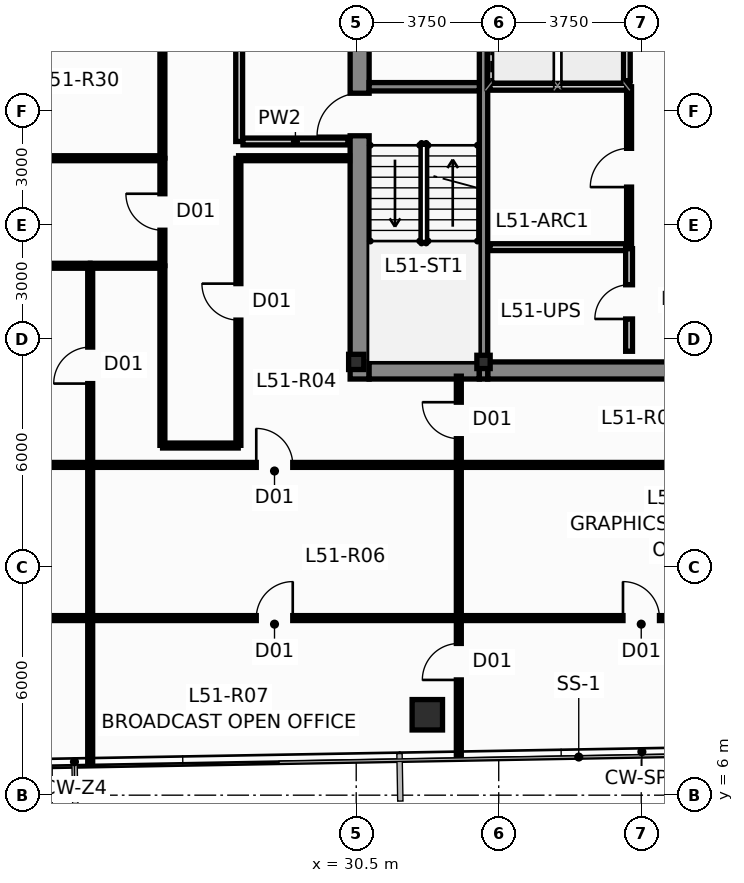
"""IFC4 building model, lengths in metres.
Left out: names, types, materials, properties, quantities, classifications, styles, units other than length and angle.
Written with IfcOpenShell. Run it as: python <this file> out.ifc"""

import sys

from ifc_helpers import new_model, si_unit, direction, frame, frame_2d, origin, origin_2d, place, context, subcontext, project, spatial, rectangle, hollow_rectangle, i_section, extrude, source, transform, mapped, element, fill, save


model = new_model("IFC4")
c1 = context("Model", 3, precision=1e-05, world=origin(), true_north=direction((0.0, 1.0)))
c2 = subcontext(c1, "Body", "Model", "MODEL_VIEW")
j1 = project(units=[si_unit("LENGTHUNIT", "METRE"), si_unit("PLANEANGLEUNIT", "RADIAN")], contexts=[c1])
p1 = place(None, origin())
s1 = spatial("IfcSite", under=j1, at=p1, CompositionType="ELEMENT")
p2 = place(p1, origin())
s2 = spatial("IfcBuilding", under=s1, at=p2, CompositionType="ELEMENT")
p3 = place(p2, frame((0.0, 0.0, 195.0)))
s3 = spatial("IfcBuildingStorey", under=s2, at=p3, CompositionType="ELEMENT", Elevation=195.0)
m1 = source(origin(), c2, "Body", "SweptSolid", [
    extrude(i_section(OverallWidth=0.4, OverallDepth=0.4, WebThickness=0.02, FlangeThickness=0.032, at=origin_2d()), origin(), (0.0, 0.0, 1.0), 3.65),
])
p4 = place(p3, frame((30.5, 17.4, 0.0), z_axis=(0.0, 0.0, 1.0), x_axis=(1.0, 0.0, 0.0)))
e1 = element("IfcColumn", 1, at=p4, inside=s3, PredefinedType="COLUMN", context=c2, shape_type="MappedRepresentation", body=[
    mapped(m1, transform((0.0, 0.0, 0.0), scale=1.0)),
])
m2 = source(origin(), c2, "Body", "SweptSolid", [
    extrude(hollow_rectangle(XDim=0.35, YDim=0.35, WallThickness=0.016, at=origin_2d()), origin(), (0.0, 0.0, 1.0), 3.65),
])
p5 = place(p3, frame((33.85, 17.4, 0.0), z_axis=(0.0, 0.0, 1.0), x_axis=(1.0, 0.0, 0.0)))
e2 = element("IfcColumn", 2, at=p5, inside=s3, PredefinedType="COLUMN", context=c2, shape_type="MappedRepresentation", body=[
    mapped(m2, transform((0.0, 0.0, 0.0), scale=1.0)),
])
p6 = place(p3, frame((30.59, 16.95, 0.0), z_axis=(0.0, 0.0, 1.0), x_axis=(0.0, 1.0, 0.0)))
e3 = element("IfcWall", 3, at=p6, inside=s3, PredefinedType="SHEAR", context=c2, shape_type="SweptSolid", body=[
    extrude(rectangle(XDim=13.275, YDim=0.5, at=frame_2d((6.638, 0.0))), origin(), (0.0, 0.0, 1.0), 3.65),
])
p7 = place(p6, frame((6.4, 0.0, 0.0)))
e4 = element("IfcOpeningElement", 4, at=p7, cuts=e3, PredefinedType="OPENING", context=c2, shape_type="SweptSolid", body=[
    extrude(rectangle(XDim=1.12, YDim=2.15, at=frame_2d((0.56, 1.075))), frame((0.0, 0.262, 0.0), z_axis=(0.0, -1.0, 0.0), x_axis=(1.0, 0.0, 0.0)), (0.0, 0.0, 1.0), 0.524),
])
p8 = place(p6, frame((10.85, 0.0, 0.0)))
e5 = element("IfcOpeningElement", 5, at=p8, cuts=e3, PredefinedType="OPENING", context=c2, shape_type="SweptSolid", body=[
    extrude(rectangle(XDim=1.2, YDim=2.2, at=frame_2d((0.6, 1.1))), frame((0.0, 0.262, 0.0), z_axis=(0.0, -1.0, 0.0), x_axis=(1.0, 0.0, 0.0)), (0.0, 0.0, 1.0), 0.524),
])
p9 = place(p3, frame((30.84, 17.175, 0.0), z_axis=(0.0, 0.0, 1.0), x_axis=(1.0, 0.0, 0.0)))
e6 = element("IfcWall", 6, at=p9, inside=s3, PredefinedType="SHEAR", context=c2, shape_type="SweptSolid", body=[
    extrude(rectangle(XDim=2.9, YDim=0.45, at=frame_2d((1.45, 0.0))), origin(), (0.0, 0.0, 1.0), 3.65),
])
p10 = place(p3, frame((33.96, 17.175, 0.0), z_axis=(0.0, 0.0, 1.0), x_axis=(1.0, 0.0, 0.0)))
e7 = element("IfcWall", 7, at=p10, inside=s3, PredefinedType="SHEAR", context=c2, shape_type="SweptSolid", body=[
    extrude(rectangle(XDim=8.08, YDim=0.45, at=frame_2d((4.04, 0.0))), origin(), (0.0, 0.0, 1.0), 3.65),
])
p11 = place(p3, frame((33.85, 16.95, 0.0), z_axis=(0.0, 0.0, 1.0), x_axis=(0.0, 1.0, 0.0)))
e8 = element("IfcWall", 8, at=p11, inside=s3, PredefinedType="SHEAR", context=c2, shape_type="SweptSolid", body=[
    extrude(rectangle(XDim=13.275, YDim=0.22, at=frame_2d((6.638, 0.0))), origin(), (0.0, 0.0, 1.0), 3.65),
])
p12 = place(p3, frame((30.84, 24.64, 0.0), z_axis=(0.0, 0.0, 1.0), x_axis=(1.0, 0.0, 0.0)))
e9 = element("IfcWall", 9, at=p12, inside=s3, PredefinedType="SHEAR", context=c2, shape_type="SweptSolid", body=[
    extrude(rectangle(XDim=2.9, YDim=0.22, at=frame_2d((1.45, 0.0))), origin(), (0.0, 0.0, 1.0), 3.65),
])
m3 = source(origin(), c2, "Body", "SweptSolid", [
    extrude(hollow_rectangle(XDim=0.8, YDim=0.8, WallThickness=0.045, at=origin_2d()), origin(), (0.0, 0.0, 1.0), 3.651),
])
p13 = place(p3, frame((32.371, 8.116, 0.0), z_axis=(-0.004547556686, 0.019795246753, 0.99979371269), x_axis=(-0.974612694662, -0.223897510936, 0.0)))
e10 = element("IfcColumn", 10, at=p13, inside=s3, PredefinedType="COLUMN", context=c2, shape_type="MappedRepresentation", body=[
    mapped(m3, transform((0.0, 0.0, 0.0), scale=1.0)),
])
p14 = place(p3, frame((37.62, 24.8, 0.0), z_axis=(0.0, 0.0, 1.0), x_axis=(0.0, 1.0, 0.0)))
e11 = element("IfcWall", 11, at=p14, inside=s3, PredefinedType="PARTITIONING", context=c2, shape_type="SweptSolid", body=[
    extrude(rectangle(XDim=2.0, YDim=0.18, at=frame_2d((1.0, 0.0))), origin(), (0.0, 0.0, 1.0), 3.4),
])
p15 = place(p3, frame((34.02, 24.64, 0.0), z_axis=(0.0, 0.0, 1.0), x_axis=(1.0, 0.0, 0.0)))
e12 = element("IfcWall", 12, at=p15, inside=s3, PredefinedType="PARTITIONING", context=c2, shape_type="SweptSolid", body=[
    extrude(rectangle(XDim=3.68, YDim=0.18, at=frame_2d((1.84, 0.0))), origin(), (0.0, 0.0, 1.0), 3.4),
])
p16 = place(p3, frame((27.42, 23.2, 0.0), z_axis=(0.0, 0.0, 1.0), x_axis=(0.0, 1.0, 0.0)))
e13 = element("IfcWall", 13, at=p16, inside=s3, PredefinedType="PARTITIONING", context=c2, shape_type="SweptSolid", body=[
    extrude(rectangle(XDim=6.4, YDim=0.18, at=frame_2d((3.2, 0.0))), origin(), (0.0, 0.0, 1.0), 3.078),
])
p17 = place(p16, frame((2.65, 0.0, 0.0)))
e14 = element("IfcOpeningElement", 14, at=p17, cuts=e13, PredefinedType="OPENING", context=c2, shape_type="SweptSolid", body=[
    extrude(rectangle(XDim=1.05, YDim=2.15, at=frame_2d((0.525, 1.075))), frame((0.0, 0.102, 0.0), z_axis=(0.0, -1.0, 0.0), x_axis=(1.0, 0.0, 0.0)), (0.0, 0.0, 1.0), 0.204),
])
p18 = place(p3, frame((27.52, 23.2, 0.0), z_axis=(0.0, 0.0, 1.0), x_axis=(1.0, 0.0, 0.0)))
e15 = element("IfcWall", 15, at=p18, inside=s3, PredefinedType="PARTITIONING", context=c2, shape_type="SweptSolid", body=[
    extrude(rectangle(XDim=2.76, YDim=0.18, at=frame_2d((1.38, 0.0))), origin(), (0.0, 0.0, 1.0), 3.4),
])
p19 = place(p3, frame((34.02, 20.42, 0.0), z_axis=(0.0, 0.0, 1.0), x_axis=(1.0, 0.0, 0.0)))
e16 = element("IfcWall", 16, at=p19, inside=s3, PredefinedType="PARTITIONING", context=c2, shape_type="SweptSolid", body=[
    extrude(rectangle(XDim=3.64, YDim=0.18, at=frame_2d((1.82, 0.0))), origin(), (0.0, 0.0, 1.0), 3.4),
])
p20 = place(p3, frame((37.68, 20.5, 0.0), z_axis=(0.0, 0.0, 1.0), x_axis=(0.0, 1.0, 0.0)))
e17 = element("IfcWall", 17, at=p20, inside=s3, PredefinedType="PARTITIONING", context=c2, shape_type="SweptSolid", body=[
    extrude(rectangle(XDim=4.14, YDim=0.13, at=frame_2d((2.07, 0.0))), origin(), (0.0, 0.0, 1.0), 3.4),
])
p21 = place(p20, frame((1.5, 0.0, 0.0)))
e18 = element("IfcOpeningElement", 18, at=p21, cuts=e17, PredefinedType="OPENING", context=c2, shape_type="SweptSolid", body=[
    extrude(rectangle(XDim=1.02, YDim=2.15, at=frame_2d((0.51, 1.075))), frame((0.0, 0.077, 0.0), z_axis=(0.0, -1.0, 0.0), x_axis=(1.0, 0.0, 0.0)), (0.0, 0.0, 1.0), 0.154),
])
p22 = place(p3, frame((37.68, 17.68, 0.0), z_axis=(0.0, 0.0, 1.0), x_axis=(0.0, 1.0, 0.0)))
e19 = element("IfcWall", 19, at=p22, inside=s3, PredefinedType="PARTITIONING", context=c2, shape_type="SweptSolid", body=[
    extrude(rectangle(XDim=2.7, YDim=0.18, at=frame_2d((1.35, 0.0))), origin(), (0.0, 0.0, 1.0), 3.4),
])
p23 = place(p22, frame((0.85, 0.0, 0.0)))
e20 = element("IfcOpeningElement", 20, at=p23, cuts=e19, PredefinedType="OPENING", context=c2, shape_type="SweptSolid", body=[
    extrude(rectangle(XDim=0.9, YDim=2.1, at=frame_2d((0.45, 1.05))), frame((0.0, 0.102, 0.0), z_axis=(0.0, -1.0, 0.0), x_axis=(1.0, 0.0, 0.0)), (0.0, 0.0, 1.0), 0.204),
])
p24 = place(p3, frame((12.313, 10.66, 0.0), z_axis=(0.0, 0.0, 1.0), x_axis=(1.0, 0.0, 0.0)))
e21 = element("IfcWall", 21, at=p24, inside=s3, PredefinedType="PARTITIONING", context=c2, shape_type="SweptSolid", body=[
    extrude(rectangle(XDim=11.182, YDim=0.13, at=frame_2d((5.591, 0.0))), origin(), (0.0, 0.0, 1.0), 3.4),
])
p25 = place(p24, frame((5.168, 0.0, 0.0)))
e22 = element("IfcOpeningElement", 22, at=p25, cuts=e21, PredefinedType="OPENING", context=c2, shape_type="SweptSolid", body=[
    extrude(rectangle(XDim=0.96, YDim=2.15, at=frame_2d((0.48, 1.075))), frame((0.0, 0.077, 0.0), z_axis=(0.0, -1.0, 0.0), x_axis=(1.0, 0.0, 0.0)), (0.0, 0.0, 1.0), 0.154),
])
p26 = place(p3, frame((12.613, 14.69, 0.0), z_axis=(0.0, 0.0, 1.0), x_axis=(1.0, 0.0, 0.0)))
e23 = element("IfcWall", 23, at=p26, inside=s3, PredefinedType="PARTITIONING", context=c2, shape_type="SweptSolid", body=[
    extrude(rectangle(XDim=10.882, YDim=0.13, at=frame_2d((5.441, 0.0))), origin(), (0.0, 0.0, 1.0), 3.4),
])
p27 = place(p26, frame((5.013, 0.0, 0.0)))
e24 = element("IfcOpeningElement", 24, at=p27, cuts=e23, PredefinedType="OPENING", context=c2, shape_type="SweptSolid", body=[
    extrude(rectangle(XDim=0.96, YDim=2.15, at=frame_2d((0.48, 1.075))), frame((0.0, 0.077, 0.0), z_axis=(0.0, -1.0, 0.0), x_axis=(1.0, 0.0, 0.0)), (0.0, 0.0, 1.0), 0.154),
])
p28 = place(p3, frame((23.505, 14.69, 0.0), z_axis=(0.0, 0.0, 1.0), x_axis=(1.0, 0.0, 0.0)))
e25 = element("IfcWall", 25, at=p28, inside=s3, PredefinedType="PARTITIONING", context=c2, shape_type="SweptSolid", body=[
    extrude(rectangle(XDim=9.69, YDim=0.13, at=frame_2d((4.845, 0.0))), origin(), (0.0, 0.0, 1.0), 3.078),
])
p29 = place(p28, frame((4.365, 0.0, 0.0)))
e26 = element("IfcOpeningElement", 26, at=p29, cuts=e25, PredefinedType="OPENING", context=c2, shape_type="SweptSolid", body=[
    extrude(rectangle(XDim=0.96, YDim=2.15, at=frame_2d((0.48, 1.075))), frame((0.0, 0.077, 0.0), z_axis=(0.0, -1.0, 0.0), x_axis=(1.0, 0.0, 0.0)), (0.0, 0.0, 1.0), 0.154),
])
p30 = place(p3, frame((23.505, 10.66, 0.0), z_axis=(0.0, 0.0, 1.0), x_axis=(1.0, 0.0, 0.0)))
e27 = element("IfcWall", 27, at=p30, inside=s3, PredefinedType="PARTITIONING", context=c2, shape_type="SweptSolid", body=[
    extrude(rectangle(XDim=9.69, YDim=0.13, at=frame_2d((4.845, 0.0))), origin(), (0.0, 0.0, 1.0), 3.078),
])
p31 = place(p30, frame((4.365, 0.0, 0.0)))
e28 = element("IfcOpeningElement", 28, at=p31, cuts=e27, PredefinedType="OPENING", context=c2, shape_type="SweptSolid", body=[
    extrude(rectangle(XDim=0.96, YDim=2.15, at=frame_2d((0.48, 1.075))), frame((0.0, 0.077, 0.0), z_axis=(0.0, -1.0, 0.0), x_axis=(1.0, 0.0, 0.0)), (0.0, 0.0, 1.0), 0.154),
])
p32 = place(p3, frame((33.205, 10.66, 0.0), z_axis=(0.0, 0.0, 1.0), x_axis=(1.0, 0.0, 0.0)))
e29 = element("IfcWall", 29, at=p32, inside=s3, PredefinedType="PARTITIONING", context=c2, shape_type="SweptSolid", body=[
    extrude(rectangle(XDim=9.59, YDim=0.13, at=frame_2d((4.795, 0.0))), origin(), (0.0, 0.0, 1.0), 3.078),
])
p33 = place(p32, frame((4.315, 0.0, 0.0)))
e30 = element("IfcOpeningElement", 30, at=p33, cuts=e29, PredefinedType="OPENING", context=c2, shape_type="SweptSolid", body=[
    extrude(rectangle(XDim=0.96, YDim=2.15, at=frame_2d((0.48, 1.075))), frame((0.0, 0.077, 0.0), z_axis=(0.0, -1.0, 0.0), x_axis=(1.0, 0.0, 0.0)), (0.0, 0.0, 1.0), 0.154),
])
p34 = place(p3, frame((33.205, 14.69, 0.0), z_axis=(0.0, 0.0, 1.0), x_axis=(1.0, 0.0, 0.0)))
e31 = element("IfcWall", 31, at=p34, inside=s3, PredefinedType="PARTITIONING", context=c2, shape_type="SweptSolid", body=[
    extrude(rectangle(XDim=9.59, YDim=0.13, at=frame_2d((4.795, 0.0))), origin(), (0.0, 0.0, 1.0), 3.078),
])
p35 = place(p3, frame((17.352, 22.76, 0.0), z_axis=(0.0, 0.0, 1.0), x_axis=(1.0, 0.0, 0.0)))
e32 = element("IfcWall", 32, at=p35, inside=s3, PredefinedType="PARTITIONING", context=c2, shape_type="SweptSolid", body=[
    extrude(rectangle(XDim=8.043, YDim=0.13, at=frame_2d((4.021, 0.0))), origin(), (0.0, 0.0, 1.0), 3.4),
])
p36 = place(p3, frame((15.69, 19.93, 0.0), z_axis=(0.0, 0.0, 1.0), x_axis=(1.0, 0.0, 0.0)))
e33 = element("IfcWall", 33, at=p36, inside=s3, PredefinedType="PARTITIONING", context=c2, shape_type="SweptSolid", body=[
    extrude(rectangle(XDim=7.805, YDim=0.13, at=frame_2d((3.902, 0.0))), origin(), (0.0, 0.0, 1.0), 3.4),
])
p37 = place(p3, frame((27.4, 15.205, 0.0), z_axis=(0.0, 0.0, 1.0), x_axis=(0.0, 1.0, 0.0)))
e34 = element("IfcWall", 34, at=p37, inside=s3, PredefinedType="PARTITIONING", context=c2, shape_type="SweptSolid", body=[
    extrude(rectangle(XDim=7.55, YDim=0.13, at=frame_2d((3.775, 0.0))), origin(), (0.0, 0.0, 1.0), 3.078),
])
p38 = place(p37, frame((3.295, 0.0, 0.0)))
e35 = element("IfcOpeningElement", 35, at=p38, cuts=e34, PredefinedType="OPENING", context=c2, shape_type="SweptSolid", body=[
    extrude(rectangle(XDim=0.96, YDim=2.15, at=frame_2d((0.48, 1.075))), frame((0.0, 0.077, 0.0), z_axis=(0.0, -1.0, 0.0), x_axis=(1.0, 0.0, 0.0)), (0.0, 0.0, 1.0), 0.154),
])
p39 = place(p3, frame((25.4, 30.095, 0.0), z_axis=(0.0, 0.0, 1.0), x_axis=(0.0, -1.0, 0.0)))
e36 = element("IfcWall", 36, at=p39, inside=s3, PredefinedType="PARTITIONING", context=c2, shape_type="SweptSolid", body=[
    extrude(rectangle(XDim=7.33, YDim=0.13, at=frame_2d((3.665, 0.0))), origin(), (0.0, 0.0, 1.0), 3.078),
])
p40 = place(p39, frame((3.185, 0.0, 0.0)))
e37 = element("IfcOpeningElement", 37, at=p40, cuts=e36, PredefinedType="OPENING", context=c2, shape_type="SweptSolid", body=[
    extrude(rectangle(XDim=0.96, YDim=2.15, at=frame_2d((0.48, 1.075))), frame((0.0, 0.077, 0.0), z_axis=(0.0, -1.0, 0.0), x_axis=(1.0, 0.0, 0.0)), (0.0, 0.0, 1.0), 0.154),
])
p41 = place(p3, frame((23.5, 14.695, 0.0), z_axis=(0.0, 0.0, 1.0), x_axis=(0.0, 1.0, 0.0)))
e38 = element("IfcWall", 38, at=p41, inside=s3, PredefinedType="PARTITIONING", context=c2, shape_type="SweptSolid", body=[
    extrude(rectangle(XDim=5.23, YDim=0.13, at=frame_2d((2.615, 0.0))), origin(), (0.0, 0.0, 1.0), 3.4),
])
p42 = place(p41, frame((2.135, 0.0, 0.0)))
e39 = element("IfcOpeningElement", 39, at=p42, cuts=e38, PredefinedType="OPENING", context=c2, shape_type="SweptSolid", body=[
    extrude(rectangle(XDim=0.96, YDim=2.15, at=frame_2d((0.48, 1.075))), frame((0.0, 0.077, 0.0), z_axis=(0.0, -1.0, 0.0), x_axis=(1.0, 0.0, 0.0)), (0.0, 0.0, 1.0), 0.154),
])
p43 = place(p3, frame((25.4, 19.925, 0.0), z_axis=(0.0, 0.0, 1.0), x_axis=(0.0, -1.0, 0.0)))
e40 = element("IfcWall", 40, at=p43, inside=s3, PredefinedType="PARTITIONING", context=c2, shape_type="SweptSolid", body=[
    extrude(rectangle(XDim=4.72, YDim=0.13, at=frame_2d((2.36, 0.0))), origin(), (0.0, 0.0, 1.0), 3.4),
])
for number, where, z_axis, x_axis in (
    (41, (23.5, 10.665, 0.0), (0.0, 0.0, 1.0), (0.0, 1.0, 0.0)),
    (42, (33.2, 10.665, 0.0), (0.0, 0.0, 1.0), (0.0, 1.0, 0.0)),
):
    element("IfcWall", number, at=place(p3, frame(where, z_axis=z_axis, x_axis=x_axis)), inside=s3, PredefinedType="PARTITIONING", context=c2, shape_type="SweptSolid", body=[
        extrude(rectangle(XDim=4.02, YDim=0.13, at=frame_2d((2.01, 0.0))), origin(), (0.0, 0.0, 1.0), 3.4),
    ])
p44 = place(p3, frame((23.5, 6.881, 0.0), z_axis=(0.0, 0.0, 1.0), x_axis=(0.0, 1.0, 0.0)))
e43 = element("IfcWall", 43, at=p44, inside=s3, PredefinedType="PARTITIONING", context=c2, shape_type="SweptSolid", body=[
    extrude(rectangle(XDim=3.774, YDim=0.13, at=frame_2d((1.887, 0.0))), origin(), (0.0, 0.0, 1.0), 3.4),
])
p45 = place(p3, frame((33.2, 7.052, 0.0), z_axis=(0.0, 0.0, 1.0), x_axis=(0.0, 1.0, 0.0)))
e44 = element("IfcWall", 44, at=p45, inside=s3, PredefinedType="PARTITIONING", context=c2, shape_type="SweptSolid", body=[
    extrude(rectangle(XDim=3.603, YDim=0.13, at=frame_2d((1.801, 0.0))), origin(), (0.0, 0.0, 1.0), 3.4),
])
p46 = place(p45, frame((1.98, 0.0, 0.0)))
e45 = element("IfcOpeningElement", 45, at=p46, cuts=e44, PredefinedType="OPENING", context=c2, shape_type="SweptSolid", body=[
    extrude(rectangle(XDim=0.96, YDim=2.15, at=frame_2d((0.48, 1.075))), frame((0.0, 0.077, 0.0), z_axis=(0.0, -1.0, 0.0), x_axis=(1.0, 0.0, 0.0)), (0.0, 0.0, 1.0), 0.154),
])
p47 = place(p3, frame((27.405, 22.76, 0.0), z_axis=(0.0, 0.0, 1.0), x_axis=(1.0, 0.0, 0.0)))
e46 = element("IfcWall", 46, at=p47, inside=s3, PredefinedType="PARTITIONING", context=c2, shape_type="SweptSolid", body=[
    extrude(rectangle(XDim=2.92, YDim=0.13, at=frame_2d((1.46, 0.0))), origin(), (0.0, 0.0, 1.0), 3.4),
])
p48 = place(p3, frame((25.4, 19.935, 0.0), z_axis=(0.0, 0.0, 1.0), x_axis=(0.0, 1.0, 0.0)))
e47 = element("IfcWall", 47, at=p48, inside=s3, PredefinedType="PARTITIONING", context=c2, shape_type="SweptSolid", body=[
    extrude(rectangle(XDim=2.82, YDim=0.13, at=frame_2d((1.41, 0.0))), origin(), (0.0, 0.0, 1.0), 3.078),
])
p49 = place(p48, frame((0.93, 0.0, 0.0)))
e48 = element("IfcOpeningElement", 48, at=p49, cuts=e47, PredefinedType="OPENING", context=c2, shape_type="SweptSolid", body=[
    extrude(rectangle(XDim=0.96, YDim=2.15, at=frame_2d((0.48, 1.075))), frame((0.0, 0.077, 0.0), z_axis=(0.0, -1.0, 0.0), x_axis=(1.0, 0.0, 0.0)), (0.0, 0.0, 1.0), 0.154),
])
p50 = place(p3, frame((33.2, 14.695, 0.0), z_axis=(0.0, 0.0, 1.0), x_axis=(0.0, 1.0, 0.0)))
e49 = element("IfcWall", 49, at=p50, inside=s3, PredefinedType="PARTITIONING", context=c2, shape_type="SweptSolid", body=[
    extrude(rectangle(XDim=2.33, YDim=0.13, at=frame_2d((1.165, 0.0))), origin(), (0.0, 0.0, 1.0), 3.4),
])
p51 = place(p50, frame((0.685, 0.0, 0.0)))
e50 = element("IfcOpeningElement", 50, at=p51, cuts=e49, PredefinedType="OPENING", context=c2, shape_type="SweptSolid", body=[
    extrude(rectangle(XDim=0.96, YDim=2.15, at=frame_2d((0.48, 1.075))), frame((0.0, 0.077, 0.0), z_axis=(0.0, -1.0, 0.0), x_axis=(1.0, 0.0, 0.0)), (0.0, 0.0, 1.0), 0.154),
])
p52 = place(p3, frame((25.405, 15.2, 0.0), z_axis=(0.0, 0.0, 1.0), x_axis=(1.0, 0.0, 0.0)))
e51 = element("IfcWall", 51, at=p52, inside=s3, PredefinedType="PARTITIONING", context=c2, shape_type="SweptSolid", body=[
    extrude(rectangle(XDim=1.99, YDim=0.13, at=frame_2d((0.995, 0.0))), origin(), (0.0, 0.0, 1.0), 3.4),
])
p53 = place(p3, frame((23.505, 19.93, 0.0), z_axis=(0.0, 0.0, 1.0), x_axis=(1.0, 0.0, 0.0)))
e52 = element("IfcWall", 52, at=p53, inside=s3, PredefinedType="PARTITIONING", context=c2, shape_type="SweptSolid", body=[
    extrude(rectangle(XDim=1.89, YDim=0.13, at=frame_2d((0.945, 0.0))), origin(), (0.0, 0.0, 1.0), 3.4),
])
p54 = place(p7, origin())
e53 = element("IfcDoor", 53, at=p54, inside=s3, OperationType="SINGLE_SWING_LEFT", PredefinedType="DOOR", context=c2, shape_type="SweptSolid", body=[
    extrude(rectangle(XDim=1.12, YDim=2.15, at=frame_2d((0.56, 1.075))), frame((0.0, 0.025, 0.0), z_axis=(0.0, -1.0, 0.0), x_axis=(1.0, 0.0, 0.0)), (0.0, 0.0, 1.0), 0.05),
])
fill(e4, e53)
p55 = place(p21, origin())
e54 = element("IfcDoor", 54, at=p55, inside=s3, OperationType="SINGLE_SWING_LEFT", PredefinedType="DOOR", context=c2, shape_type="SweptSolid", body=[
    extrude(rectangle(XDim=1.02, YDim=2.15, at=frame_2d((0.51, 1.075))), frame((0.0, 0.025, 0.0), z_axis=(0.0, -1.0, 0.0), x_axis=(1.0, 0.0, 0.0)), (0.0, 0.0, 1.0), 0.05),
])
fill(e18, e54)
p56 = place(p23, origin())
e55 = element("IfcDoor", 55, at=p56, inside=s3, OperationType="SINGLE_SWING_LEFT", PredefinedType="DOOR", context=c2, shape_type="SweptSolid", body=[
    extrude(rectangle(XDim=0.9, YDim=2.1, at=frame_2d((0.45, 1.05))), frame((0.0, 0.025, 0.0), z_axis=(0.0, -1.0, 0.0), x_axis=(1.0, 0.0, 0.0)), (0.0, 0.0, 1.0), 0.05),
])
fill(e20, e55)
p57 = place(p29, origin())
e56 = element("IfcDoor", 56, at=p57, inside=s3, OperationType="SINGLE_SWING_LEFT", PredefinedType="DOOR", context=c2, shape_type="SweptSolid", body=[
    extrude(rectangle(XDim=0.96, YDim=2.15, at=frame_2d((0.48, 1.075))), frame((0.0, 0.025, 0.0), z_axis=(0.0, -1.0, 0.0), x_axis=(1.0, 0.0, 0.0)), (0.0, 0.0, 1.0), 0.05),
])
fill(e26, e56)
p58 = place(p31, origin())
e57 = element("IfcDoor", 57, at=p58, inside=s3, OperationType="SINGLE_SWING_RIGHT", PredefinedType="DOOR", context=c2, shape_type="SweptSolid", body=[
    extrude(rectangle(XDim=0.96, YDim=2.15, at=frame_2d((0.48, 1.075))), frame((0.0, 0.025, 0.0), z_axis=(0.0, -1.0, 0.0), x_axis=(1.0, 0.0, 0.0)), (0.0, 0.0, 1.0), 0.05),
])
fill(e28, e57)
p59 = place(p33, origin())
e58 = element("IfcDoor", 58, at=p59, inside=s3, OperationType="SINGLE_SWING_LEFT", PredefinedType="DOOR", context=c2, shape_type="SweptSolid", body=[
    extrude(rectangle(XDim=0.96, YDim=2.15, at=frame_2d((0.48, 1.075))), frame((0.0, 0.025, 0.0), z_axis=(0.0, -1.0, 0.0), x_axis=(1.0, 0.0, 0.0)), (0.0, 0.0, 1.0), 0.05),
])
fill(e30, e58)
p60 = place(p38, origin())
e59 = element("IfcDoor", 59, at=p60, inside=s3, OperationType="SINGLE_SWING_RIGHT", PredefinedType="DOOR", context=c2, shape_type="SweptSolid", body=[
    extrude(rectangle(XDim=0.96, YDim=2.15, at=frame_2d((0.48, 1.075))), frame((0.0, 0.025, 0.0), z_axis=(0.0, -1.0, 0.0), x_axis=(1.0, 0.0, 0.0)), (0.0, 0.0, 1.0), 0.05),
])
fill(e35, e59)
p61 = place(p42, origin())
e60 = element("IfcDoor", 60, at=p61, inside=s3, OperationType="SINGLE_SWING_LEFT", PredefinedType="DOOR", context=c2, shape_type="SweptSolid", body=[
    extrude(rectangle(XDim=0.96, YDim=2.15, at=frame_2d((0.48, 1.075))), frame((0.0, 0.025, 0.0), z_axis=(0.0, -1.0, 0.0), x_axis=(1.0, 0.0, 0.0)), (0.0, 0.0, 1.0), 0.05),
])
fill(e39, e60)
p62 = place(p46, origin())
e61 = element("IfcDoor", 61, at=p62, inside=s3, OperationType="SINGLE_SWING_LEFT", PredefinedType="DOOR", context=c2, shape_type="SweptSolid", body=[
    extrude(rectangle(XDim=0.96, YDim=2.15, at=frame_2d((0.48, 1.075))), frame((0.0, 0.025, 0.0), z_axis=(0.0, -1.0, 0.0), x_axis=(1.0, 0.0, 0.0)), (0.0, 0.0, 1.0), 0.05),
])
fill(e45, e61)
p63 = place(p49, origin())
e62 = element("IfcDoor", 62, at=p63, inside=s3, OperationType="SINGLE_SWING_RIGHT", PredefinedType="DOOR", context=c2, shape_type="SweptSolid", body=[
    extrude(rectangle(XDim=0.96, YDim=2.15, at=frame_2d((0.48, 1.075))), frame((0.0, 0.025, 0.0), z_axis=(0.0, -1.0, 0.0), x_axis=(1.0, 0.0, 0.0)), (0.0, 0.0, 1.0), 0.05),
])
fill(e48, e62)
p64 = place(p51, origin())
e63 = element("IfcDoor", 63, at=p64, inside=s3, OperationType="SINGLE_SWING_RIGHT", PredefinedType="DOOR", context=c2, shape_type="SweptSolid", body=[
    extrude(rectangle(XDim=0.96, YDim=2.15, at=frame_2d((0.48, 1.075))), frame((0.0, 0.025, 0.0), z_axis=(0.0, -1.0, 0.0), x_axis=(1.0, 0.0, 0.0)), (0.0, 0.0, 1.0), 0.05),
])
fill(e50, e63)
save(model, sys.argv[1])
